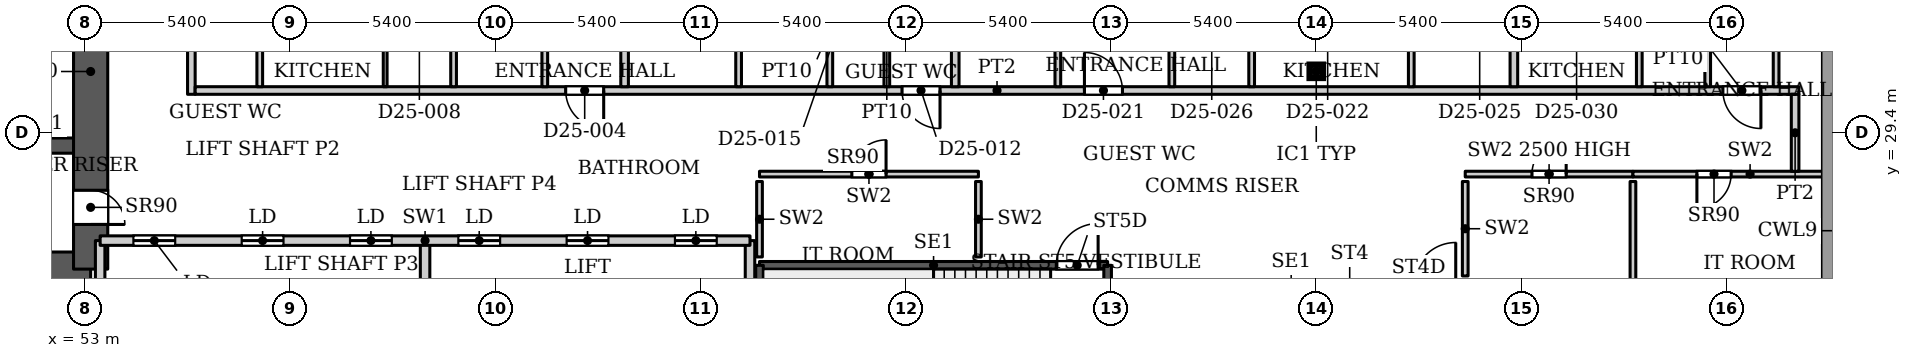
"""IFC4 building model, lengths in metres.
Left out: names, types, materials, properties, quantities, classifications, styles, units other than length and angle.
Written with IfcOpenShell. Run it as: python <this file> out.ifc"""

import sys

from ifc_helpers import new_model, si_unit, direction, frame, frame_2d, origin, origin_2d, place, context, subcontext, project, spatial, rectangle, hollow_rectangle, extrude, source, transform, mapped, element, fill, save


model = new_model("IFC4")
c1 = context("Model", 3, precision=1e-05, world=origin(), true_north=direction((0.0, 1.0)))
c2 = subcontext(c1, "Body", "Model", "MODEL_VIEW")
j1 = project(units=[si_unit("LENGTHUNIT", "METRE"), si_unit("PLANEANGLEUNIT", "RADIAN")], contexts=[c1])
p1 = place(None, origin())
s1 = spatial("IfcSite", under=j1, at=p1, CompositionType="ELEMENT")
p2 = place(p1, origin())
s2 = spatial("IfcBuilding", under=s1, at=p2, CompositionType="ELEMENT")
p3 = place(p2, frame((0.0, 0.0, 109.7)))
s3 = spatial("IfcBuildingStorey", under=s2, at=p3, CompositionType="ELEMENT", Elevation=109.7)
p4 = place(p3, frame((85.4, 31.005, 0.0), z_axis=(0.0, 0.0, 1.0), x_axis=(1.0, 0.0, 0.0)))
e1 = element("IfcColumn", 1, at=p4, inside=s3, PredefinedType="COLUMN", context=c2, shape_type="SweptSolid", body=[
    extrude(hollow_rectangle(XDim=0.356, YDim=0.356, WallThickness=0.016, InnerFilletRadius=0.016, OuterFilletRadius=0.032, at=origin_2d()), origin(), (0.0, 0.0, 1.0), 3.9),
])
p5 = place(p3, frame((34.75, 25.8, 0.0), z_axis=(0.0, 0.0, 1.0), x_axis=(1.0, 0.0, 0.0)))
e2 = element("IfcWall", 2, at=p5, inside=s3, PredefinedType="SHEAR", context=c2, shape_type="SweptSolid", body=[
    extrude(rectangle(XDim=18.4, YDim=0.9, at=frame_2d((9.2, 0.0))), origin(), (0.0, 0.0, 1.0), 3.9),
])
p6 = place(p3, frame((34.75, 29.05, 0.0), z_axis=(0.0, 0.0, 1.0), x_axis=(1.0, 0.0, 0.0)))
e3 = element("IfcWall", 3, at=p6, inside=s3, PredefinedType="SHEAR", context=c2, shape_type="SweptSolid", body=[
    extrude(rectangle(XDim=18.4, YDim=0.4, at=frame_2d((9.2, 0.0))), origin(), (0.0, 0.0, 1.0), 3.9),
])
p7 = place(p6, frame((15.125, 0.0, 0.0)))
e4 = element("IfcOpeningElement", 4, at=p7, cuts=e3, PredefinedType="OPENING", context=c2, shape_type="SweptSolid", body=[
    extrude(rectangle(XDim=1.1, YDim=2.2, at=frame_2d((0.55, 1.1))), frame((0.0, 0.21, 0.0), z_axis=(0.0, -1.0, 0.0), x_axis=(1.0, 0.0, 0.0)), (0.0, 0.0, 1.0), 0.42),
])
p8 = place(p3, frame((53.15, 25.8, 0.0), z_axis=(0.0, 0.0, 1.0), x_axis=(0.0, 1.0, 0.0)))
e5 = element("IfcWall", 5, at=p8, inside=s3, PredefinedType="SHEAR", context=c2, shape_type="SweptSolid", body=[
    extrude(rectangle(XDim=10.4, YDim=0.9, at=frame_2d((5.2, 0.0))), origin(), (0.0, 0.0, 1.0), 3.9),
])
p9 = place(p8, frame((1.175, 0.0, 0.0)))
e6 = element("IfcOpeningElement", 6, at=p9, cuts=e5, PredefinedType="OPENING", context=c2, shape_type="SweptSolid", body=[
    extrude(rectangle(XDim=0.9, YDim=2.2, at=frame_2d((0.45, 1.1))), frame((0.0, 0.46, 0.0), z_axis=(0.0, -1.0, 0.0), x_axis=(1.0, 0.0, 0.0)), (0.0, 0.0, 1.0), 0.92),
])
p10 = place(p3, frame((70.75, 25.9, 0.0), z_axis=(0.0, 0.0, 1.0), x_axis=(1.0, 0.0, 0.0)))
e7 = element("IfcWall", 7, at=p10, inside=s3, PredefinedType="SHEAR", context=c2, shape_type="SweptSolid", body=[
    extrude(rectangle(XDim=9.16, YDim=0.2, at=frame_2d((4.58, 0.0))), origin(), (0.0, 0.0, 1.0), 3.9),
])
p11 = place(p10, frame((7.81, 0.0, 0.0)))
e8 = element("IfcOpeningElement", 8, at=p11, cuts=e7, PredefinedType="OPENING", context=c2, shape_type="SweptSolid", body=[
    extrude(rectangle(XDim=1.1, YDim=2.2, at=frame_2d((0.55, 1.1))), frame((0.0, 0.11, 0.0), z_axis=(0.0, -1.0, 0.0), x_axis=(1.0, 0.0, 0.0)), (0.0, 0.0, 1.0), 0.22),
])
for number, where, z_axis, x_axis in (
    (9, (70.75, 22.75, 0.0), (0.0, 0.0, 1.0), (0.0, 1.0, 0.0)),
    (10, (79.91, 22.75, 0.0), (0.0, 0.0, 1.0), (0.0, 1.0, 0.0)),
):
    element("IfcWall", number, at=place(p3, frame(where, z_axis=z_axis, x_axis=x_axis)), inside=s3, PredefinedType="SHEAR", context=c2, shape_type="SweptSolid", body=[
        extrude(rectangle(XDim=3.15, YDim=0.2, at=frame_2d((1.575, 0.0))), origin(), (0.0, 0.0, 1.0), 3.9),
    ])
for number, where, z_axis, x_axis in (
    (11, (53.4, 23.7, 0.0), (0.0, 0.0, 1.0), (0.0, 1.0, 0.0)),
    (12, (61.95, 23.7, 0.0), (0.0, 0.0, 1.0), (0.0, 1.0, 0.0)),
    (13, (70.5, 23.7, 0.0), (0.0, 0.0, 1.0), (0.0, 1.0, 0.0)),
):
    element("IfcWall", number, at=place(p3, frame(where, z_axis=z_axis, x_axis=x_axis)), inside=s3, PredefinedType="PARTITIONING", context=c2, shape_type="SweptSolid", body=[
        extrude(rectangle(XDim=2.85, YDim=0.25, at=frame_2d((1.425, 0.0))), origin(), (0.0, 0.0, 1.0), 3.9),
    ])
p12 = place(p3, frame((53.4, 26.55, 0.0), z_axis=(0.0, 0.0, 1.0), x_axis=(1.0, 0.0, 0.0)))
e14 = element("IfcWall", 14, at=p12, inside=s3, PredefinedType="PARTITIONING", context=c2, shape_type="SweptSolid", body=[
    extrude(rectangle(XDim=17.1, YDim=0.25, at=frame_2d((8.55, 0.0))), origin(), (0.0, 0.0, 1.0), 3.9),
])
p13 = place(p12, frame((0.875, 0.0, 0.0)))
e15 = element("IfcOpeningElement", 15, at=p13, cuts=e14, PredefinedType="OPENING", context=c2, shape_type="SweptSolid", body=[
    extrude(rectangle(XDim=1.1, YDim=2.2, at=frame_2d((0.55, 1.1))), frame((0.0, 0.135, 0.0), z_axis=(0.0, -1.0, 0.0), x_axis=(1.0, 0.0, 0.0)), (0.0, 0.0, 1.0), 0.27),
])
p14 = place(p12, frame((3.725, 0.0, 0.0)))
e16 = element("IfcOpeningElement", 16, at=p14, cuts=e14, PredefinedType="OPENING", context=c2, shape_type="SweptSolid", body=[
    extrude(rectangle(XDim=1.1, YDim=2.2, at=frame_2d((0.55, 1.1))), frame((0.0, 0.135, 0.0), z_axis=(0.0, -1.0, 0.0), x_axis=(1.0, 0.0, 0.0)), (0.0, 0.0, 1.0), 0.27),
])
p15 = place(p12, frame((6.575, 0.0, 0.0)))
e17 = element("IfcOpeningElement", 17, at=p15, cuts=e14, PredefinedType="OPENING", context=c2, shape_type="SweptSolid", body=[
    extrude(rectangle(XDim=1.1, YDim=2.2, at=frame_2d((0.55, 1.1))), frame((0.0, 0.135, 0.0), z_axis=(0.0, -1.0, 0.0), x_axis=(1.0, 0.0, 0.0)), (0.0, 0.0, 1.0), 0.27),
])
p16 = place(p12, frame((9.425, 0.0, 0.0)))
e18 = element("IfcOpeningElement", 18, at=p16, cuts=e14, PredefinedType="OPENING", context=c2, shape_type="SweptSolid", body=[
    extrude(rectangle(XDim=1.1, YDim=2.2, at=frame_2d((0.55, 1.1))), frame((0.0, 0.135, 0.0), z_axis=(0.0, -1.0, 0.0), x_axis=(1.0, 0.0, 0.0)), (0.0, 0.0, 1.0), 0.27),
])
p17 = place(p12, frame((12.275, 0.0, 0.0)))
e19 = element("IfcOpeningElement", 19, at=p17, cuts=e14, PredefinedType="OPENING", context=c2, shape_type="SweptSolid", body=[
    extrude(rectangle(XDim=1.1, YDim=2.2, at=frame_2d((0.55, 1.1))), frame((0.0, 0.135, 0.0), z_axis=(0.0, -1.0, 0.0), x_axis=(1.0, 0.0, 0.0)), (0.0, 0.0, 1.0), 0.27),
])
p18 = place(p12, frame((15.125, 0.0, 0.0)))
e20 = element("IfcOpeningElement", 20, at=p18, cuts=e14, PredefinedType="OPENING", context=c2, shape_type="SweptSolid", body=[
    extrude(rectangle(XDim=1.1, YDim=2.2, at=frame_2d((0.55, 1.1))), frame((0.0, 0.135, 0.0), z_axis=(0.0, -1.0, 0.0), x_axis=(1.0, 0.0, 0.0)), (0.0, 0.0, 1.0), 0.27),
])
p19 = place(p3, frame((70.75, 28.3, 0.0), z_axis=(0.0, 0.0, 1.0), x_axis=(1.0, 0.0, 0.0)))
e21 = element("IfcWall", 21, at=p19, inside=s3, PredefinedType="PARTITIONING", context=c2, shape_type="SweptSolid", body=[
    extrude(rectangle(XDim=5.76, YDim=0.15, at=frame_2d((2.88, 0.0))), origin(), (0.0, 0.0, 1.0), 3.9),
])
p20 = place(p19, frame((2.43, 0.0, 0.0)))
e22 = element("IfcOpeningElement", 22, at=p20, cuts=e21, PredefinedType="OPENING", context=c2, shape_type="SweptSolid", body=[
    extrude(rectangle(XDim=0.9, YDim=2.2, at=frame_2d((0.45, 1.1))), frame((0.0, 0.085, 0.0), z_axis=(0.0, -1.0, 0.0), x_axis=(1.0, 0.0, 0.0)), (0.0, 0.0, 1.0), 0.17),
])
for number, where, z_axis, x_axis in (
    (23, (70.75, 26.12, 0.0), (0.0, 0.0, 1.0), (0.0, 1.0, 0.0)),
    (24, (76.51, 26.12, 0.0), (0.0, 0.0, 1.0), (0.0, 1.0, 0.0)),
):
    element("IfcWall", number, at=place(p3, frame(where, z_axis=z_axis, x_axis=x_axis)), inside=s3, PredefinedType="PARTITIONING", context=c2, shape_type="SweptSolid", body=[
        extrude(rectangle(XDim=1.985, YDim=0.15, at=frame_2d((0.992, 0.0))), origin(), (0.0, 0.0, 1.0), 3.9),
    ])
p21 = place(p3, frame((89.32, 28.3, 0.0), z_axis=(0.0, 0.0, 1.0), x_axis=(1.0, 0.0, 0.0)))
e25 = element("IfcWall", 25, at=p21, inside=s3, PredefinedType="PARTITIONING", context=c2, shape_type="SweptSolid", body=[
    extrude(rectangle(XDim=4.413, YDim=0.15, at=frame_2d((2.207, 0.0))), origin(), (0.0, 0.0, 1.0), 2.5),
])
p22 = place(p21, frame((1.756, 0.0, 0.0)))
e26 = element("IfcOpeningElement", 26, at=p22, cuts=e25, PredefinedType="OPENING", context=c2, shape_type="SweptSolid", body=[
    extrude(rectangle(XDim=0.9, YDim=2.2, at=frame_2d((0.45, 1.1))), frame((0.0, 0.085, 0.0), z_axis=(0.0, -1.0, 0.0), x_axis=(1.0, 0.0, 0.0)), (0.0, 0.0, 1.0), 0.17),
])
p23 = place(p3, frame((89.32, 25.62, 0.0), z_axis=(0.0, 0.0, 1.0), x_axis=(0.0, 1.0, 0.0)))
e27 = element("IfcWall", 27, at=p23, inside=s3, PredefinedType="PARTITIONING", context=c2, shape_type="SweptSolid", body=[
    extrude(rectangle(XDim=2.485, YDim=0.15, at=frame_2d((1.242, 0.0))), origin(), (0.0, 0.0, 1.0), 3.9),
])
p24 = place(p3, frame((93.733, 21.338, 0.0), z_axis=(0.0, 0.0, 1.0), x_axis=(0.0, 1.0, 0.0)))
e28 = element("IfcWall", 28, at=p24, inside=s3, PredefinedType="PARTITIONING", context=c2, shape_type="SweptSolid", body=[
    extrude(rectangle(XDim=6.767, YDim=0.15, at=frame_2d((3.384, 0.0))), origin(), (0.0, 0.0, 1.0), 3.9),
])
p25 = place(p3, frame((93.733, 28.3, 0.0), z_axis=(0.0, 0.0, 1.0), x_axis=(1.0, 0.0, 0.0)))
e29 = element("IfcWall", 29, at=p25, inside=s3, PredefinedType="PARTITIONING", context=c2, shape_type="SweptSolid", body=[
    extrude(rectangle(XDim=6.165, YDim=0.15, at=frame_2d((3.083, 0.0))), origin(), (0.0, 0.0, 1.0), 3.9),
])
p26 = place(p25, frame((1.683, 0.0, 0.0)))
e30 = element("IfcOpeningElement", 30, at=p26, cuts=e29, PredefinedType="OPENING", context=c2, shape_type="SweptSolid", body=[
    extrude(rectangle(XDim=0.9, YDim=2.2, at=frame_2d((0.45, 1.1))), frame((0.0, 0.085, 0.0), z_axis=(0.0, -1.0, 0.0), x_axis=(1.0, 0.0, 0.0)), (0.0, 0.0, 1.0), 0.17),
])
p27 = place(p3, frame((55.8, 30.4, 0.0), z_axis=(0.0, 0.0, 1.0), x_axis=(0.0, 1.0, 0.0)))
e31 = element("IfcWall", 31, at=p27, inside=s3, PredefinedType="PARTITIONING", context=c2, shape_type="SweptSolid", body=[
    extrude(rectangle(XDim=13.5, YDim=0.2, at=frame_2d((6.75, 0.0))), origin(), (0.0, 0.0, 1.0), 3.6),
])
p28 = place(p3, frame((55.9, 30.5, 0.0), z_axis=(0.0, 0.0, 1.0), x_axis=(1.0, 0.0, 0.0)))
e32 = element("IfcWall", 32, at=p28, inside=s3, PredefinedType="PARTITIONING", context=c2, shape_type="SweptSolid", body=[
    extrude(rectangle(XDim=42.2, YDim=0.2, at=frame_2d((21.1, 0.0))), origin(), (0.0, 0.0, 1.0), 3.6),
])
p29 = place(p28, frame((9.75, 0.0, 0.0)))
e33 = element("IfcOpeningElement", 33, at=p29, cuts=e32, PredefinedType="OPENING", context=c2, shape_type="SweptSolid", body=[
    extrude(rectangle(XDim=1.0, YDim=2.1, at=frame_2d((0.5, 1.05))), frame((0.0, 0.11, 0.0), z_axis=(0.0, -1.0, 0.0), x_axis=(1.0, 0.0, 0.0)), (0.0, 0.0, 1.0), 0.22),
])
p30 = place(p28, frame((18.6, 0.0, 0.0)))
e34 = element("IfcOpeningElement", 34, at=p30, cuts=e32, PredefinedType="OPENING", context=c2, shape_type="SweptSolid", body=[
    extrude(rectangle(XDim=1.0, YDim=2.1, at=frame_2d((0.5, 1.05))), frame((0.0, 0.11, 0.0), z_axis=(0.0, -1.0, 0.0), x_axis=(1.0, 0.0, 0.0)), (0.0, 0.0, 1.0), 0.22),
])
p31 = place(p28, frame((23.4, 0.0, 0.0)))
e35 = element("IfcOpeningElement", 35, at=p31, cuts=e32, PredefinedType="OPENING", context=c2, shape_type="SweptSolid", body=[
    extrude(rectangle(XDim=1.0, YDim=2.1, at=frame_2d((0.5, 1.05))), frame((0.0, 0.11, 0.0), z_axis=(0.0, -1.0, 0.0), x_axis=(1.0, 0.0, 0.0)), (0.0, 0.0, 1.0), 0.22),
])
p32 = place(p28, frame((40.2, 0.0, 0.0)))
e36 = element("IfcOpeningElement", 36, at=p32, cuts=e32, PredefinedType="OPENING", context=c2, shape_type="SweptSolid", body=[
    extrude(rectangle(XDim=1.0, YDim=2.1, at=frame_2d((0.5, 1.05))), frame((0.0, 0.11, 0.0), z_axis=(0.0, -1.0, 0.0), x_axis=(1.0, 0.0, 0.0)), (0.0, 0.0, 1.0), 0.22),
])
p33 = place(p3, frame((57.6, 30.6, 0.0), z_axis=(0.0, 0.0, 1.0), x_axis=(0.0, 1.0, 0.0)))
e37 = element("IfcWall", 37, at=p33, inside=s3, PredefinedType="PARTITIONING", context=c2, shape_type="SweptSolid", body=[
    extrude(rectangle(XDim=3.025, YDim=0.15, at=frame_2d((1.512, 0.0))), origin(), (0.0, 0.0, 1.0), 3.6),
])
p34 = place(p3, frame((60.9, 30.6, 0.0), z_axis=(0.0, 0.0, 1.0), x_axis=(0.0, 1.0, 0.0)))
e38 = element("IfcWall", 38, at=p34, inside=s3, PredefinedType="PARTITIONING", context=c2, shape_type="SweptSolid", body=[
    extrude(rectangle(XDim=3.025, YDim=0.1, at=frame_2d((1.512, 0.0))), origin(), (0.0, 0.0, 1.0), 3.6),
])
for number, where, z_axis, x_axis in (
    (39, (62.7, 30.6, 0.0), (0.0, 0.0, 1.0), (0.0, 1.0, 0.0)),
    (40, (65.1, 30.6, 0.0), (0.0, 0.0, 1.0), (0.0, 1.0, 0.0)),
):
    element("IfcWall", number, at=place(p3, frame(where, z_axis=z_axis, x_axis=x_axis)), inside=s3, PredefinedType="PARTITIONING", context=c2, shape_type="SweptSolid", body=[
        extrude(rectangle(XDim=3.025, YDim=0.15, at=frame_2d((1.512, 0.0))), origin(), (0.0, 0.0, 1.0), 3.6),
    ])
p35 = place(p3, frame((67.2, 30.6, 0.0), z_axis=(0.0, 0.0, 1.0), x_axis=(0.0, 1.0, 0.0)))
e41 = element("IfcWall", 41, at=p35, inside=s3, PredefinedType="PARTITIONING", context=c2, shape_type="SweptSolid", body=[
    extrude(rectangle(XDim=13.3, YDim=0.2, at=frame_2d((6.65, 0.0))), origin(), (0.0, 0.0, 1.0), 3.6),
])
for number, where, z_axis, x_axis in (
    (42, (70.2, 30.6, 0.0), (0.0, 0.0, 1.0), (0.0, 1.0, 0.0)),
    (43, (72.6, 30.6, 0.0), (0.0, 0.0, 1.0), (0.0, 1.0, 0.0)),
    (44, (74.1, 30.6, 0.0), (0.0, 0.0, 1.0), (0.0, 1.0, 0.0)),
):
    element("IfcWall", number, at=place(p3, frame(where, z_axis=z_axis, x_axis=x_axis)), inside=s3, PredefinedType="PARTITIONING", context=c2, shape_type="SweptSolid", body=[
        extrude(rectangle(XDim=3.025, YDim=0.15, at=frame_2d((1.512, 0.0))), origin(), (0.0, 0.0, 1.0), 3.6),
    ])
p36 = place(p3, frame((75.9, 30.6, 0.0), z_axis=(0.0, 0.0, 1.0), x_axis=(0.0, 1.0, 0.0)))
e45 = element("IfcWall", 45, at=p36, inside=s3, PredefinedType="PARTITIONING", context=c2, shape_type="SweptSolid", body=[
    extrude(rectangle(XDim=13.3, YDim=0.2, at=frame_2d((6.65, 0.0))), origin(), (0.0, 0.0, 1.0), 3.6),
])
p37 = place(p3, frame((78.6, 30.6, 0.0), z_axis=(0.0, 0.0, 1.0), x_axis=(0.0, 1.0, 0.0)))
e46 = element("IfcWall", 46, at=p37, inside=s3, PredefinedType="PARTITIONING", context=c2, shape_type="SweptSolid", body=[
    extrude(rectangle(XDim=3.175, YDim=0.15, at=frame_2d((1.587, 0.0))), origin(), (0.0, 0.0, 1.0), 3.6),
])
for number, where, z_axis, x_axis in (
    (47, (81.6, 30.6, 0.0), (0.0, 0.0, 1.0), (0.0, 1.0, 0.0)),
    (48, (83.7, 30.6, 0.0), (0.0, 0.0, 1.0), (0.0, 1.0, 0.0)),
    (49, (87.9, 30.6, 0.0), (0.0, 0.0, 1.0), (0.0, 1.0, 0.0)),
):
    element("IfcWall", number, at=place(p3, frame(where, z_axis=z_axis, x_axis=x_axis)), inside=s3, PredefinedType="PARTITIONING", context=c2, shape_type="SweptSolid", body=[
        extrude(rectangle(XDim=3.025, YDim=0.15, at=frame_2d((1.512, 0.0))), origin(), (0.0, 0.0, 1.0), 3.6),
    ])
p38 = place(p3, frame((90.6, 30.6, 0.0), z_axis=(0.0, 0.0, 1.0), x_axis=(0.0, 1.0, 0.0)))
e50 = element("IfcWall", 50, at=p38, inside=s3, PredefinedType="PARTITIONING", context=c2, shape_type="SweptSolid", body=[
    extrude(rectangle(XDim=13.3, YDim=0.2, at=frame_2d((6.65, 0.0))), origin(), (0.0, 0.0, 1.0), 2.5),
])
for number, where, z_axis, x_axis in (
    (51, (93.9, 30.6, 0.0), (0.0, 0.0, 1.0), (0.0, 1.0, 0.0)),
    (52, (95.7, 30.6, 0.0), (0.0, 0.0, 1.0), (0.0, 1.0, 0.0)),
):
    element("IfcWall", number, at=place(p3, frame(where, z_axis=z_axis, x_axis=x_axis)), inside=s3, PredefinedType="PARTITIONING", context=c2, shape_type="SweptSolid", body=[
        extrude(rectangle(XDim=3.025, YDim=0.15, at=frame_2d((1.512, 0.0))), origin(), (0.0, 0.0, 1.0), 3.6),
    ])
p39 = place(p3, frame((97.5, 30.6, 0.0), z_axis=(0.0, 0.0, 1.0), x_axis=(0.0, 1.0, 0.0)))
e53 = element("IfcWall", 53, at=p39, inside=s3, PredefinedType="PARTITIONING", context=c2, shape_type="SweptSolid", body=[
    extrude(rectangle(XDim=3.175, YDim=0.15, at=frame_2d((1.587, 0.0))), origin(), (0.0, 0.0, 1.0), 3.6),
])
p40 = place(p3, frame((98.0, 28.374, 0.0), z_axis=(0.0, 0.0, 1.0), x_axis=(0.0, 1.0, 0.0)))
e54 = element("IfcWall", 54, at=p40, inside=s3, PredefinedType="PARTITIONING", context=c2, shape_type="SweptSolid", body=[
    extrude(rectangle(XDim=2.026, YDim=0.2, at=frame_2d((1.013, 0.0))), origin(), (0.0, 0.0, 1.0), 3.6),
])
m1 = source(origin(), c2, "Body", "SweptSolid", [
    extrude(rectangle(XDim=1.1, YDim=2.2, at=frame_2d((0.55, 1.1))), frame((0.0, 0.025, 0.0), z_axis=(0.0, -1.0, 0.0), x_axis=(1.0, 0.0, 0.0)), (0.0, 0.0, 1.0), 0.05),
])
p41 = place(p13, origin())
e55 = element("IfcDoor", 55, at=p41, inside=s3, OperationType="SLIDING_TO_LEFT", PredefinedType="DOOR", context=c2, shape_type="MappedRepresentation", body=[
    mapped(m1, transform((0.0, 0.0, 0.0), x_axis=(1.0, 0.0, 0.0), y_axis=(0.0, 1.0, 0.0), z_axis=(0.0, 0.0, 1.0), scale=1.0)),
])
fill(e15, e55)
p42 = place(p14, origin())
e56 = element("IfcDoor", 56, at=p42, inside=s3, OperationType="SLIDING_TO_LEFT", PredefinedType="DOOR", context=c2, shape_type="MappedRepresentation", body=[
    mapped(m1, transform((0.0, 0.0, 0.0), x_axis=(1.0, 0.0, 0.0), y_axis=(0.0, 1.0, 0.0), z_axis=(0.0, 0.0, 1.0), scale=1.0)),
])
fill(e16, e56)
p43 = place(p15, origin())
e57 = element("IfcDoor", 57, at=p43, inside=s3, OperationType="SLIDING_TO_LEFT", PredefinedType="DOOR", context=c2, shape_type="MappedRepresentation", body=[
    mapped(m1, transform((0.0, 0.0, 0.0), x_axis=(1.0, 0.0, 0.0), y_axis=(0.0, 1.0, 0.0), z_axis=(0.0, 0.0, 1.0), scale=1.0)),
])
fill(e17, e57)
p44 = place(p16, origin())
e58 = element("IfcDoor", 58, at=p44, inside=s3, OperationType="SLIDING_TO_LEFT", PredefinedType="DOOR", context=c2, shape_type="MappedRepresentation", body=[
    mapped(m1, transform((0.0, 0.0, 0.0), x_axis=(1.0, 0.0, 0.0), y_axis=(0.0, 1.0, 0.0), z_axis=(0.0, 0.0, 1.0), scale=1.0)),
])
fill(e18, e58)
p45 = place(p17, origin())
e59 = element("IfcDoor", 59, at=p45, inside=s3, OperationType="SLIDING_TO_LEFT", PredefinedType="DOOR", context=c2, shape_type="MappedRepresentation", body=[
    mapped(m1, transform((0.0, 0.0, 0.0), x_axis=(1.0, 0.0, 0.0), y_axis=(0.0, 1.0, 0.0), z_axis=(0.0, 0.0, 1.0), scale=1.0)),
])
fill(e19, e59)
p46 = place(p18, origin())
e60 = element("IfcDoor", 60, at=p46, inside=s3, OperationType="SLIDING_TO_LEFT", PredefinedType="DOOR", context=c2, shape_type="MappedRepresentation", body=[
    mapped(m1, transform((0.0, 0.0, 0.0), x_axis=(1.0, 0.0, 0.0), y_axis=(0.0, 1.0, 0.0), z_axis=(0.0, 0.0, 1.0), scale=1.0)),
])
fill(e20, e60)
m2 = source(origin(), c2, "Body", "SweptSolid", [
    extrude(rectangle(XDim=0.9, YDim=2.2, at=frame_2d((0.45, 1.1))), frame((0.0, 0.025, 0.0), z_axis=(0.0, -1.0, 0.0), x_axis=(1.0, 0.0, 0.0)), (0.0, 0.0, 1.0), 0.05),
])
p47 = place(p9, origin())
e61 = element("IfcDoor", 61, at=p47, inside=s3, OperationType="SINGLE_SWING_RIGHT", PredefinedType="DOOR", context=c2, shape_type="MappedRepresentation", body=[
    mapped(m2, transform((0.0, 0.0, 0.0), x_axis=(1.0, 0.0, 0.0), y_axis=(0.0, 1.0, 0.0), z_axis=(0.0, 0.0, 1.0), scale=1.0)),
])
fill(e6, e61)
p48 = place(p20, origin())
e62 = element("IfcDoor", 62, at=p48, inside=s3, OperationType="SINGLE_SWING_LEFT", PredefinedType="DOOR", context=c2, shape_type="MappedRepresentation", body=[
    mapped(m2, transform((0.0, 0.0, 0.0), x_axis=(1.0, 0.0, 0.0), y_axis=(0.0, 1.0, 0.0), z_axis=(0.0, 0.0, 1.0), scale=1.0)),
])
fill(e22, e62)
p49 = place(p22, origin())
e63 = element("IfcDoor", 63, at=p49, inside=s3, OperationType="SINGLE_SWING_LEFT", PredefinedType="DOOR", context=c2, shape_type="MappedRepresentation", body=[
    mapped(m2, transform((0.0, 0.0, 0.0), x_axis=(1.0, 0.0, 0.0), y_axis=(0.0, 1.0, 0.0), z_axis=(0.0, 0.0, 1.0), scale=1.0)),
])
fill(e26, e63)
p50 = place(p26, origin())
e64 = element("IfcDoor", 64, at=p50, inside=s3, OperationType="SINGLE_SWING_RIGHT", PredefinedType="DOOR", context=c2, shape_type="MappedRepresentation", body=[
    mapped(m2, transform((0.0, 0.0, 0.0), x_axis=(1.0, 0.0, 0.0), y_axis=(0.0, 1.0, 0.0), z_axis=(0.0, 0.0, 1.0), scale=1.0)),
])
fill(e30, e64)
m3 = source(origin(), c2, "Body", "SweptSolid", [
    extrude(rectangle(XDim=1.1, YDim=2.2, at=frame_2d((0.55, 1.1))), frame((0.0, 0.025, 0.0), z_axis=(0.0, -1.0, 0.0), x_axis=(1.0, 0.0, 0.0)), (0.0, 0.0, 1.0), 0.05),
])
p51 = place(p11, origin())
e65 = element("IfcDoor", 65, at=p51, inside=s3, OperationType="SINGLE_SWING_LEFT", PredefinedType="DOOR", context=c2, shape_type="MappedRepresentation", body=[
    mapped(m3, transform((0.0, 0.0, 0.0), x_axis=(1.0, 0.0, 0.0), y_axis=(0.0, 1.0, 0.0), z_axis=(0.0, 0.0, 1.0), scale=1.0)),
])
fill(e8, e65)
m4 = source(origin(), c2, "Body", "SweptSolid", [
    extrude(rectangle(XDim=1.0, YDim=2.1, at=frame_2d((0.5, 1.05))), frame((0.0, 0.025, 0.0), z_axis=(0.0, -1.0, 0.0), x_axis=(1.0, 0.0, 0.0)), (0.0, 0.0, 1.0), 0.05),
])
p52 = place(p29, origin())
e66 = element("IfcDoor", 66, at=p52, inside=s3, OperationType="SINGLE_SWING_RIGHT", PredefinedType="DOOR", context=c2, shape_type="MappedRepresentation", body=[
    mapped(m4, transform((0.0, 0.0, 0.0), x_axis=(1.0, 0.0, 0.0), y_axis=(0.0, 1.0, 0.0), z_axis=(0.0, 0.0, 1.0), scale=1.0)),
])
fill(e33, e66)
p53 = place(p30, origin())
e67 = element("IfcDoor", 67, at=p53, inside=s3, OperationType="SINGLE_SWING_RIGHT", PredefinedType="DOOR", context=c2, shape_type="MappedRepresentation", body=[
    mapped(m4, transform((0.0, 0.0, 0.0), x_axis=(1.0, 0.0, 0.0), y_axis=(0.0, 1.0, 0.0), z_axis=(0.0, 0.0, 1.0), scale=1.0)),
])
fill(e34, e67)
p54 = place(p31, origin())
e68 = element("IfcDoor", 68, at=p54, inside=s3, OperationType="SINGLE_SWING_LEFT", PredefinedType="DOOR", context=c2, shape_type="MappedRepresentation", body=[
    mapped(m4, transform((0.0, 0.0, 0.0), x_axis=(1.0, 0.0, 0.0), y_axis=(0.0, 1.0, 0.0), z_axis=(0.0, 0.0, 1.0), scale=1.0)),
])
fill(e35, e68)
p55 = place(p32, origin())
e69 = element("IfcDoor", 69, at=p55, inside=s3, OperationType="SINGLE_SWING_RIGHT", PredefinedType="DOOR", context=c2, shape_type="MappedRepresentation", body=[
    mapped(m4, transform((0.0, 0.0, 0.0), x_axis=(1.0, 0.0, 0.0), y_axis=(0.0, 1.0, 0.0), z_axis=(0.0, 0.0, 1.0), scale=1.0)),
])
fill(e36, e69)
save(model, sys.argv[1])
